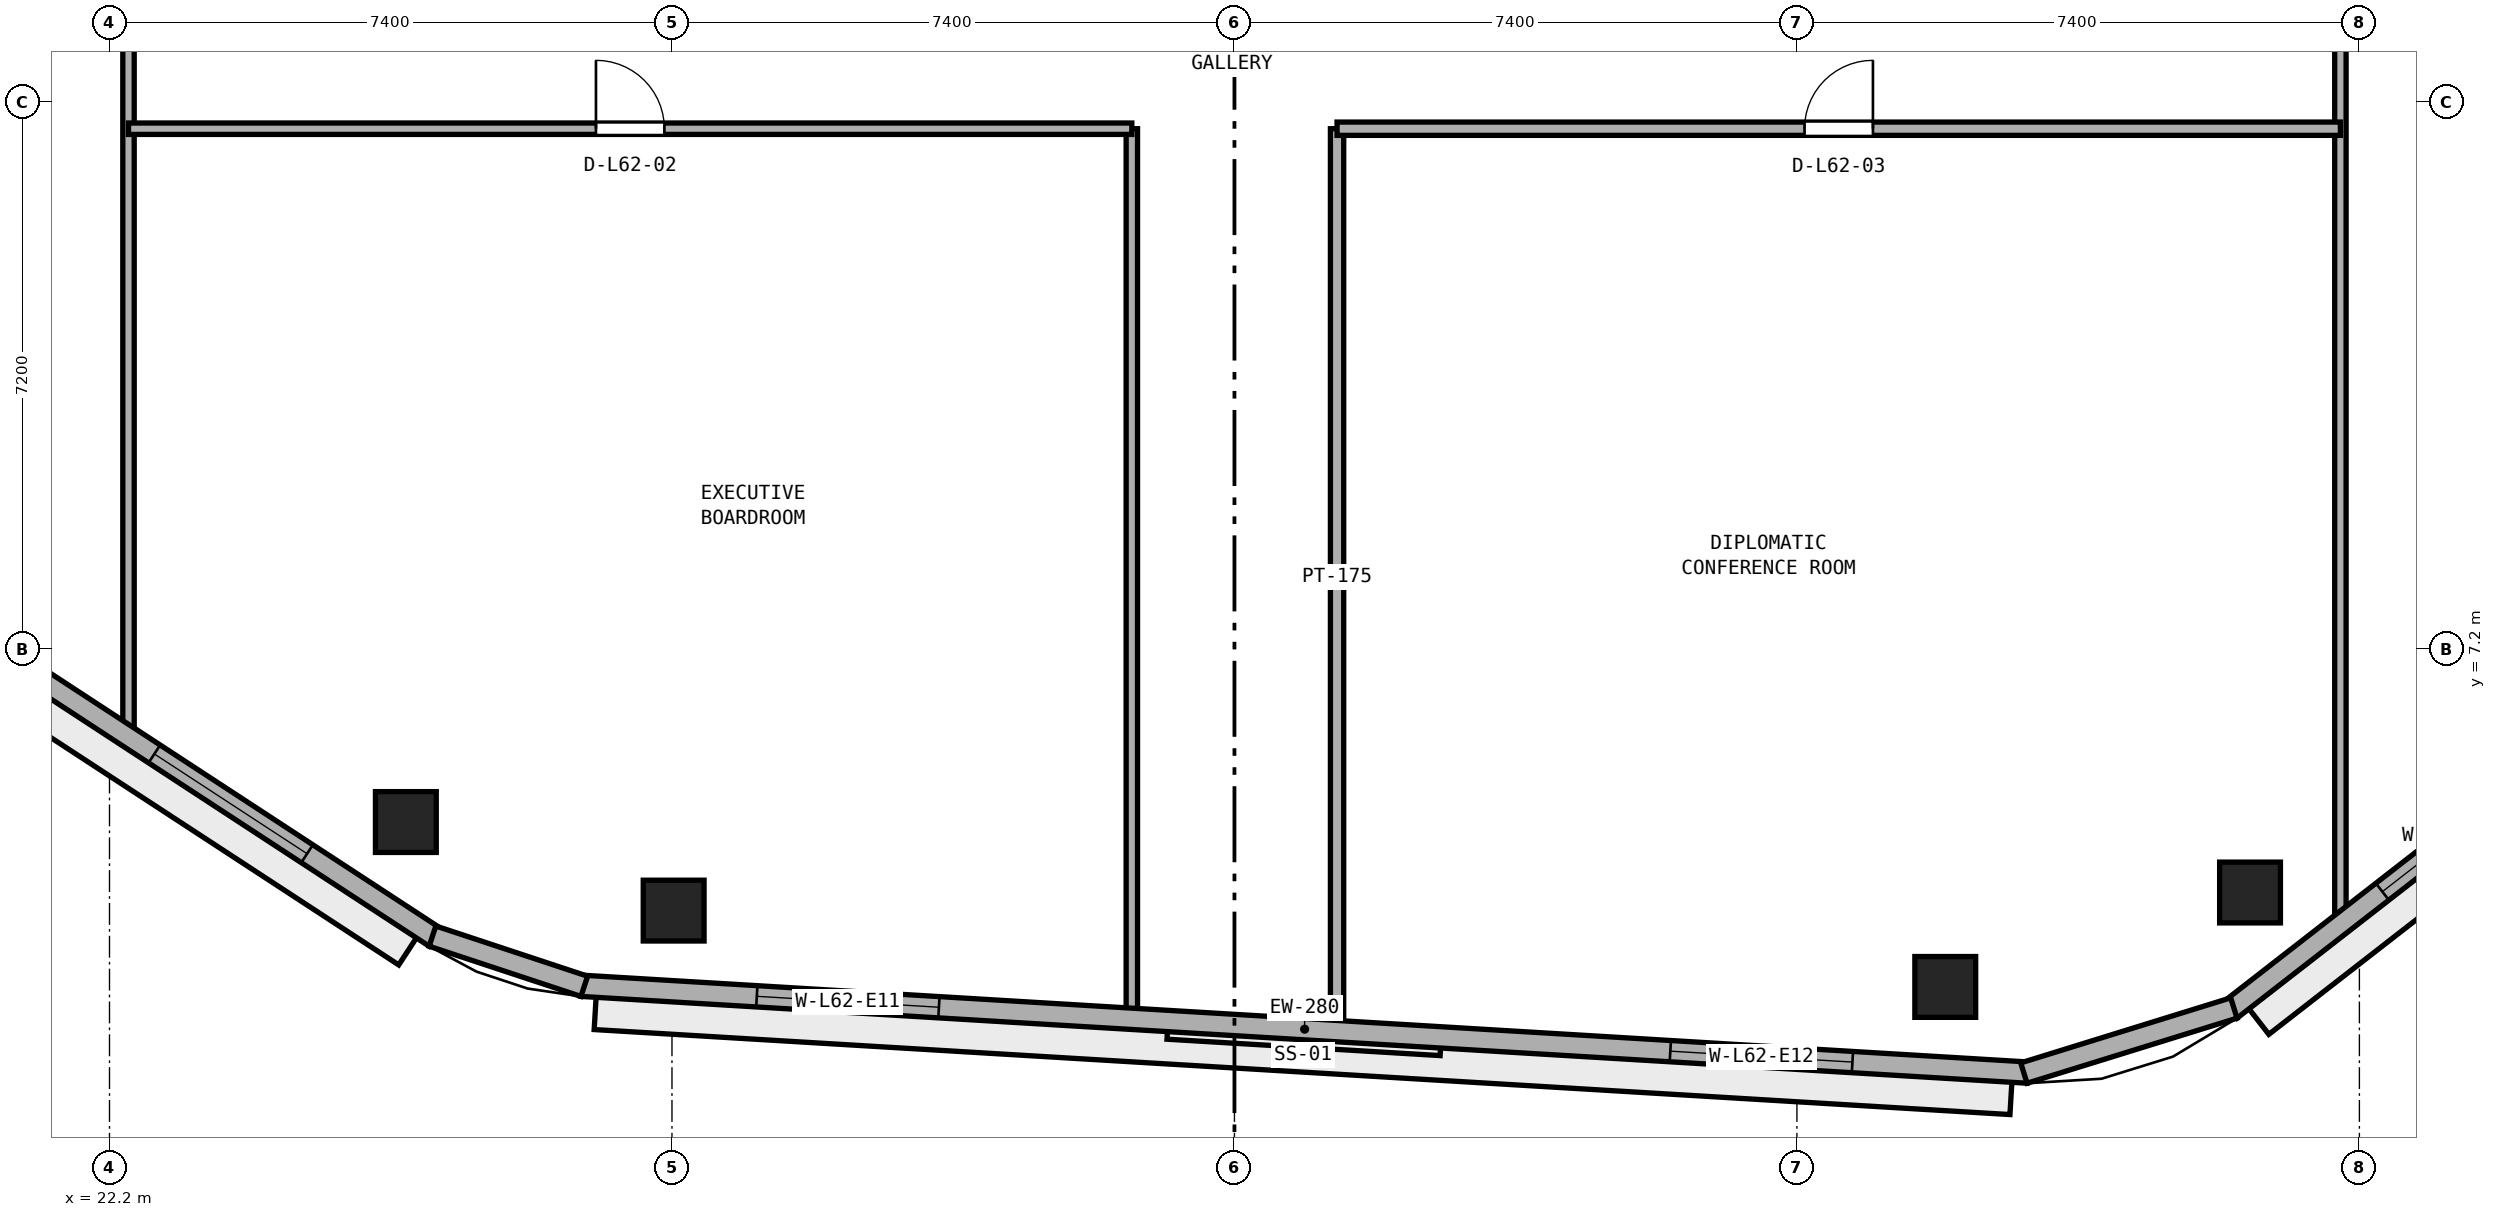
"""IFC4 building model, lengths in metres.
Left out: names, types, materials, properties, quantities, classifications, styles, units other than length and angle.
Written with IfcOpenShell. Run it as: python <this file> out.ifc"""

import sys

from ifc_helpers import new_model, si_unit, direction, frame, frame_2d, origin, origin_2d, place, context, subcontext, project, spatial, rectangle, extrude, element, fill, save


model = new_model("IFC4")
c1 = context("Model", 3, precision=1e-05, world=origin(), true_north=direction((0.0, 1.0)))
c2 = subcontext(c1, "Body", "Model", "MODEL_VIEW")
j1 = project(units=[si_unit("LENGTHUNIT", "METRE"), si_unit("PLANEANGLEUNIT", "RADIAN")], contexts=[c1])
p1 = place(None, origin())
s1 = spatial("IfcSite", under=j1, at=p1, CompositionType="ELEMENT")
p2 = place(p1, origin())
s2 = spatial("IfcBuilding", under=s1, at=p2, CompositionType="ELEMENT")
p3 = place(p2, frame((0.0, 0.0, 244.0)))
s3 = spatial("IfcBuildingStorey", under=s2, at=p3, CompositionType="ELEMENT", Elevation=244.0)
for number, where, z_axis, x_axis in (
    (1, (29.622, 3.764, 0.0), (0.0, 0.0, 1.0), (1.0, 0.0, 0.0)),
    (2, (46.352, 2.76, 0.0), (0.0, 0.0, 1.0), (1.0, 0.0, 0.0)),
    (3, (50.361, 4.002, 0.0), (0.0, 0.0, 1.0), (1.0, 0.0, 0.0)),
    (4, (26.099, 4.929, 0.0), (0.0, 0.0, 1.0), (1.0, 0.0, 0.0)),
):
    element("IfcColumn", number, at=place(p3, frame(where, z_axis=z_axis, x_axis=x_axis)), inside=s3, PredefinedType="COLUMN", context=c2, shape_type="SweptSolid", body=[
        extrude(rectangle(XDim=0.8, YDim=0.8, at=origin_2d()), origin(), (0.0, 0.0, 1.0), 3.8),
    ])
p4 = place(p3, frame((51.55, 3.546, 0.0), z_axis=(0.0, 0.0, 1.0), x_axis=(0.0, 1.0, 0.0)))
e5 = element("IfcWall", 5, at=p4, inside=s3, PredefinedType="PARTITIONING", context=c2, shape_type="SweptSolid", body=[
    extrude(rectangle(XDim=24.254, YDim=0.15, at=frame_2d((12.127, 0.0))), origin(), (0.0, 0.0, 1.0), 3.51),
])
p5 = place(p4, frame((16.759, 0.0, 0.0)))
e6 = element("IfcOpeningElement", 6, at=p5, cuts=e5, PredefinedType="OPENING", context=c2, shape_type="SweptSolid", body=[
    extrude(rectangle(XDim=1.0, YDim=2.12, at=frame_2d((0.5, 1.06))), frame((0.0, 0.085, 0.0), z_axis=(0.0, -1.0, 0.0), x_axis=(1.0, 0.0, 0.0)), (0.0, 0.0, 1.0), 0.17),
])
p6 = place(p3, frame((38.35, 2.243, 0.0), z_axis=(0.0, 0.0, 1.0), x_axis=(0.0, 1.0, 0.0)))
e7 = element("IfcWall", 7, at=p6, inside=s3, PredefinedType="PARTITIONING", context=c2, shape_type="SweptSolid", body=[
    extrude(rectangle(XDim=11.807, YDim=0.175, at=frame_2d((5.904, 0.0))), origin(), (0.0, 0.0, 1.0), 3.51),
])
p7 = place(p3, frame((35.65, 2.405, 0.0), z_axis=(0.0, 0.0, 1.0), x_axis=(0.0, 1.0, 0.0)))
e8 = element("IfcWall", 8, at=p7, inside=s3, PredefinedType="PARTITIONING", context=c2, shape_type="SweptSolid", body=[
    extrude(rectangle(XDim=11.645, YDim=0.15, at=frame_2d((5.823, 0.0))), origin(), (0.0, 0.0, 1.0), 3.51),
])
p8 = place(p3, frame((22.45, 6.02, 0.0), z_axis=(0.0, 0.0, 1.0), x_axis=(0.0, 1.0, 0.0)))
e9 = element("IfcWall", 9, at=p8, inside=s3, PredefinedType="PARTITIONING", context=c2, shape_type="SweptSolid", body=[
    extrude(rectangle(XDim=38.106, YDim=0.15, at=frame_2d((19.053, 0.0))), origin(), (0.0, 0.0, 1.0), 3.51),
])
p9 = place(p8, frame((11.005, 0.0, 0.0)))
e10 = element("IfcOpeningElement", 10, at=p9, cuts=e9, PredefinedType="OPENING", context=c2, shape_type="SweptSolid", body=[
    extrude(rectangle(XDim=0.9, YDim=2.1, at=frame_2d((0.45, 1.05))), frame((0.0, 0.085, 0.0), z_axis=(0.0, -1.0, 0.0), x_axis=(1.0, 0.0, 0.0)), (0.0, 0.0, 1.0), 0.17),
])
p10 = place(p8, frame((22.155, 0.0, 0.0)))
e11 = element("IfcOpeningElement", 11, at=p10, cuts=e9, PredefinedType="OPENING", context=c2, shape_type="SweptSolid", body=[
    extrude(rectangle(XDim=0.9, YDim=2.1, at=frame_2d((0.45, 1.05))), frame((0.0, 0.085, 0.0), z_axis=(0.0, -1.0, 0.0), x_axis=(1.0, 0.0, 0.0)), (0.0, 0.0, 1.0), 0.17),
])
p11 = place(p3, frame((22.45, 14.05, 0.0), z_axis=(0.0, 0.0, 1.0), x_axis=(1.0, 0.0, 0.0)))
e12 = element("IfcWall", 12, at=p11, inside=s3, PredefinedType="PARTITIONING", context=c2, shape_type="SweptSolid", body=[
    extrude(rectangle(XDim=13.2, YDim=0.15, at=frame_2d((6.6, 0.0))), origin(), (0.0, 0.0, 1.0), 3.51),
])
p12 = place(p11, frame((6.15, 0.0, 0.0)))
e13 = element("IfcOpeningElement", 13, at=p12, cuts=e12, PredefinedType="OPENING", context=c2, shape_type="SweptSolid", body=[
    extrude(rectangle(XDim=0.9, YDim=2.1, at=frame_2d((0.45, 1.05))), frame((0.0, 0.085, 0.0), z_axis=(0.0, -1.0, 0.0), x_axis=(1.0, 0.0, 0.0)), (0.0, 0.0, 1.0), 0.17),
])
p13 = place(p3, frame((38.35, 14.05, 0.0), z_axis=(0.0, 0.0, 1.0), x_axis=(1.0, 0.0, 0.0)))
e14 = element("IfcWall", 14, at=p13, inside=s3, PredefinedType="PARTITIONING", context=c2, shape_type="SweptSolid", body=[
    extrude(rectangle(XDim=13.2, YDim=0.175, at=frame_2d((6.6, 0.0))), origin(), (0.0, 0.0, 1.0), 3.51),
])
p14 = place(p13, frame((6.15, 0.0, 0.0)))
e15 = element("IfcOpeningElement", 15, at=p14, cuts=e14, PredefinedType="OPENING", context=c2, shape_type="SweptSolid", body=[
    extrude(rectangle(XDim=0.9, YDim=2.1, at=frame_2d((0.45, 1.05))), frame((0.0, 0.097, 0.0), z_axis=(0.0, -1.0, 0.0), x_axis=(1.0, 0.0, 0.0)), (0.0, 0.0, 1.0), 0.195),
])
p15 = place(p3, frame((28.411, 2.774, 0.0), z_axis=(0.0, 0.0, 1.0), x_axis=(0.998203068368, -0.059921901676, 0.0)))
e16 = element("IfcWall", 16, at=p15, inside=s3, PredefinedType="STANDARD", context=c2, shape_type="SweptSolid", body=[
    extrude(rectangle(XDim=19.06, YDim=0.28, at=frame_2d((9.53, 0.0))), origin(), (0.0, 0.0, 1.0), 3.51),
])
p16 = place(p15, frame((2.31, 0.0, 0.9)))
e17 = element("IfcOpeningElement", 17, at=p16, cuts=e16, PredefinedType="OPENING", context=c2, shape_type="SweptSolid", body=[
    extrude(rectangle(XDim=2.4, YDim=1.75, at=frame_2d((1.2, 0.875))), frame((0.0, 0.15, 0.0), z_axis=(0.0, -1.0, 0.0), x_axis=(1.0, 0.0, 0.0)), (0.0, 0.0, 1.0), 0.3),
])
p17 = place(p15, frame((14.35, 0.0, 0.9)))
e18 = element("IfcOpeningElement", 18, at=p17, cuts=e16, PredefinedType="OPENING", context=c2, shape_type="SweptSolid", body=[
    extrude(rectangle(XDim=2.4, YDim=1.75, at=frame_2d((1.2, 0.875))), frame((0.0, 0.15, 0.0), z_axis=(0.0, -1.0, 0.0), x_axis=(1.0, 0.0, 0.0)), (0.0, 0.0, 1.0), 0.3),
])
p18 = place(p3, frame((50.104, 2.459, 0.0), z_axis=(0.0, 0.0, 1.0), x_axis=(0.789464857485, 0.613795763097, 0.0)))
e19 = element("IfcWall", 19, at=p18, inside=s3, PredefinedType="STANDARD", context=c2, shape_type="SweptSolid", body=[
    extrude(rectangle(XDim=17.387, YDim=0.28, at=frame_2d((8.694, 0.0))), origin(), (0.0, 0.0, 1.0), 3.51),
])
p19 = place(p18, frame((2.531, 0.0, 0.9)))
e20 = element("IfcOpeningElement", 20, at=p19, cuts=e19, PredefinedType="OPENING", context=c2, shape_type="SweptSolid", body=[
    extrude(rectangle(XDim=2.4, YDim=1.75, at=frame_2d((1.2, 0.875))), frame((0.0, 0.15, 0.0), z_axis=(0.0, -1.0, 0.0), x_axis=(1.0, 0.0, 0.0)), (0.0, 0.0, 1.0), 0.3),
])
p20 = place(p18, frame((7.494, 0.0, 0.9)))
e21 = element("IfcOpeningElement", 21, at=p20, cuts=e19, PredefinedType="OPENING", context=c2, shape_type="SweptSolid", body=[
    extrude(rectangle(XDim=2.4, YDim=1.75, at=frame_2d((1.2, 0.875))), frame((0.0, 0.15, 0.0), z_axis=(0.0, -1.0, 0.0), x_axis=(1.0, 0.0, 0.0)), (0.0, 0.0, 1.0), 0.3),
])
p21 = place(p18, frame((12.956, 0.0, 0.9)))
e22 = element("IfcOpeningElement", 22, at=p21, cuts=e19, PredefinedType="OPENING", context=c2, shape_type="SweptSolid", body=[
    extrude(rectangle(XDim=2.4, YDim=1.75, at=frame_2d((1.2, 0.875))), frame((0.0, 0.15, 0.0), z_axis=(0.0, -1.0, 0.0), x_axis=(1.0, 0.0, 0.0)), (0.0, 0.0, 1.0), 0.3),
])
p22 = place(p3, frame((12.034, 12.854, 0.0), z_axis=(0.0, 0.0, 1.0), x_axis=(0.837118352984, -0.547021812269, 0.0)))
e23 = element("IfcWall", 23, at=p22, inside=s3, PredefinedType="STANDARD", context=c2, shape_type="SweptSolid", body=[
    extrude(rectangle(XDim=17.259, YDim=0.28, at=frame_2d((8.63, 0.0))), origin(), (0.0, 0.0, 1.0), 3.51),
])
p23 = place(p22, frame((2.01, 0.0, 0.9)))
e24 = element("IfcOpeningElement", 24, at=p23, cuts=e23, PredefinedType="OPENING", context=c2, shape_type="SweptSolid", body=[
    extrude(rectangle(XDim=2.4, YDim=1.75, at=frame_2d((1.2, 0.875))), frame((0.0, 0.15, 0.0), z_axis=(0.0, -1.0, 0.0), x_axis=(1.0, 0.0, 0.0)), (0.0, 0.0, 1.0), 0.3),
])
p24 = place(p22, frame((7.43, 0.0, 0.9)))
e25 = element("IfcOpeningElement", 25, at=p24, cuts=e23, PredefinedType="OPENING", context=c2, shape_type="SweptSolid", body=[
    extrude(rectangle(XDim=2.4, YDim=1.75, at=frame_2d((1.2, 0.875))), frame((0.0, 0.15, 0.0), z_axis=(0.0, -1.0, 0.0), x_axis=(1.0, 0.0, 0.0)), (0.0, 0.0, 1.0), 0.3),
])
p25 = place(p22, frame((12.849, 0.0, 0.9)))
e26 = element("IfcOpeningElement", 26, at=p25, cuts=e23, PredefinedType="OPENING", context=c2, shape_type="SweptSolid", body=[
    extrude(rectangle(XDim=2.4, YDim=1.75, at=frame_2d((1.2, 0.875))), frame((0.0, 0.15, 0.0), z_axis=(0.0, -1.0, 0.0), x_axis=(1.0, 0.0, 0.0)), (0.0, 0.0, 1.0), 0.3),
])
p26 = place(p3, frame((47.386, 1.626, 0.0), z_axis=(0.0, 0.0, 1.0), x_axis=(0.955189316149, 0.29599555793, 0.0)))
e27 = element("IfcWall", 27, at=p26, inside=s3, PredefinedType="STANDARD", context=c2, shape_type="SweptSolid", body=[
    extrude(rectangle(XDim=2.892, YDim=0.28, at=frame_2d((1.446, 0.0))), origin(), (0.0, 0.0, 1.0), 3.51),
])
p27 = place(p3, frame((26.449, 3.428, 0.0), z_axis=(0.0, 0.0, 1.0), x_axis=(0.949435039229, -0.313963542923, 0.0)))
e28 = element("IfcWall", 28, at=p27, inside=s3, PredefinedType="STANDARD", context=c2, shape_type="SweptSolid", body=[
    extrude(rectangle(XDim=2.104, YDim=0.28, at=frame_2d((1.052, 0.0))), origin(), (0.0, 0.0, 1.0), 3.51),
])
p28 = place(p12, origin())
e29 = element("IfcDoor", 29, at=p28, inside=s3, OperationType="SINGLE_SWING_LEFT", PredefinedType="DOOR", context=c2, shape_type="SweptSolid", body=[
    extrude(rectangle(XDim=0.9, YDim=2.1, at=frame_2d((0.45, 1.05))), frame((0.0, 0.025, 0.0), z_axis=(0.0, -1.0, 0.0), x_axis=(1.0, 0.0, 0.0)), (0.0, 0.0, 1.0), 0.05),
])
fill(e13, e29)
p29 = place(p14, origin())
e30 = element("IfcDoor", 30, at=p29, inside=s3, OperationType="SINGLE_SWING_RIGHT", PredefinedType="DOOR", context=c2, shape_type="SweptSolid", body=[
    extrude(rectangle(XDim=0.9, YDim=2.1, at=frame_2d((0.45, 1.05))), frame((0.0, 0.025, 0.0), z_axis=(0.0, -1.0, 0.0), x_axis=(1.0, 0.0, 0.0)), (0.0, 0.0, 1.0), 0.05),
])
fill(e15, e30)
p30 = place(p16, origin())
e31 = element("IfcWindow", 31, at=p30, inside=s3, PartitioningType="SINGLE_PANEL", PredefinedType="WINDOW", context=c2, shape_type="SweptSolid", body=[
    extrude(rectangle(XDim=2.4, YDim=1.75, at=frame_2d((1.2, 0.875))), frame((0.0, 0.03, 0.0), z_axis=(0.0, -1.0, 0.0), x_axis=(1.0, 0.0, 0.0)), (0.0, 0.0, 1.0), 0.06),
])
fill(e17, e31)
p31 = place(p17, origin())
e32 = element("IfcWindow", 32, at=p31, inside=s3, PartitioningType="SINGLE_PANEL", PredefinedType="WINDOW", context=c2, shape_type="SweptSolid", body=[
    extrude(rectangle(XDim=2.4, YDim=1.75, at=frame_2d((1.2, 0.875))), frame((0.0, 0.03, 0.0), z_axis=(0.0, -1.0, 0.0), x_axis=(1.0, 0.0, 0.0)), (0.0, 0.0, 1.0), 0.06),
])
fill(e18, e32)
p32 = place(p19, origin())
e33 = element("IfcWindow", 33, at=p32, inside=s3, PartitioningType="SINGLE_PANEL", PredefinedType="WINDOW", context=c2, shape_type="SweptSolid", body=[
    extrude(rectangle(XDim=2.4, YDim=1.75, at=frame_2d((1.2, 0.875))), frame((0.0, 0.03, 0.0), z_axis=(0.0, -1.0, 0.0), x_axis=(1.0, 0.0, 0.0)), (0.0, 0.0, 1.0), 0.06),
])
fill(e20, e33)
p33 = place(p25, origin())
e34 = element("IfcWindow", 34, at=p33, inside=s3, PartitioningType="SINGLE_PANEL", PredefinedType="WINDOW", context=c2, shape_type="SweptSolid", body=[
    extrude(rectangle(XDim=2.4, YDim=1.75, at=frame_2d((1.2, 0.875))), frame((0.0, 0.03, 0.0), z_axis=(0.0, -1.0, 0.0), x_axis=(1.0, 0.0, 0.0)), (0.0, 0.0, 1.0), 0.06),
])
fill(e26, e34)
save(model, sys.argv[1])
